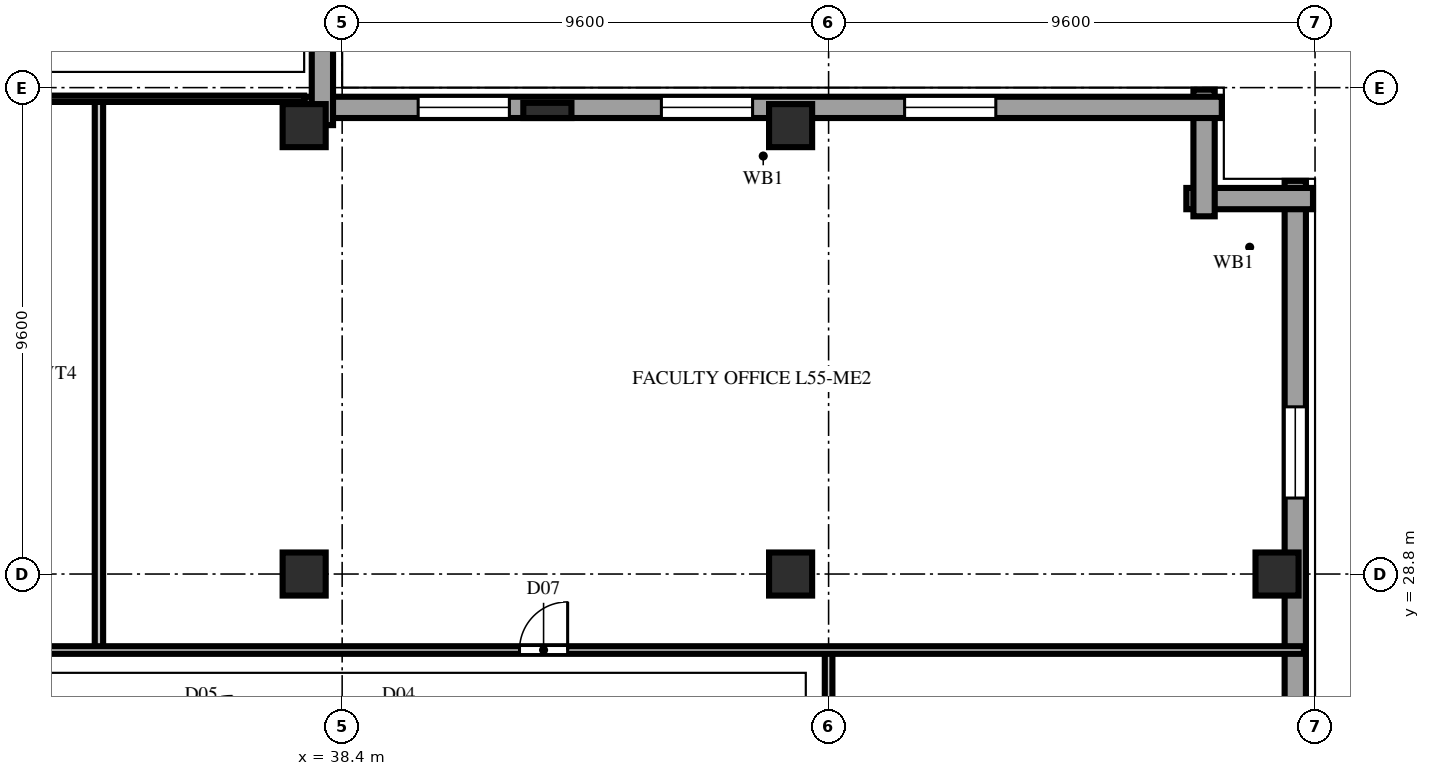
"""IFC4 building model, lengths in metres.
Left out: names, types, materials, properties, quantities, classifications, styles, units other than length and angle.
Written with IfcOpenShell. Run it as: python <this file> out.ifc"""

import sys

from ifc_helpers import new_model, si_unit, direction, frame, frame_2d, origin, origin_2d, place, context, subcontext, project, spatial, rectangle, extrude, element, fill, save


model = new_model("IFC4")
c1 = context("Model", 3, precision=1e-05, world=origin(), true_north=direction((0.0, 1.0)))
c2 = subcontext(c1, "Body", "Model", "MODEL_VIEW")
j1 = project(units=[si_unit("LENGTHUNIT", "METRE"), si_unit("PLANEANGLEUNIT", "RADIAN")], contexts=[c1])
p1 = place(None, origin())
s1 = spatial("IfcSite", under=j1, at=p1, CompositionType="ELEMENT")
p2 = place(p1, origin())
s2 = spatial("IfcBuilding", under=s1, at=p2, CompositionType="ELEMENT")
p3 = place(p2, frame((0.0, 0.0, 218.0)))
s3 = spatial("IfcBuildingStorey", under=s2, at=p3, CompositionType="ELEMENT", Elevation=218.0)
for number, where, z_axis, x_axis in (
    (1, (37.65, 28.8, 0.0), (0.0, 0.0, 1.0), (1.0, 0.0, 0.0)),
    (2, (37.65, 37.65, 0.0), (0.0, 0.0, 1.0), (1.0, 0.0, 0.0)),
    (3, (47.25, 28.8, 0.0), (0.0, 0.0, 1.0), (1.0, 0.0, 0.0)),
    (4, (47.25, 37.65, 0.0), (0.0, 0.0, 1.0), (1.0, 0.0, 0.0)),
    (5, (56.85, 28.8, 0.0), (0.0, 0.0, 1.0), (1.0, 0.0, 0.0)),
):
    element("IfcColumn", number, at=place(p3, frame(where, z_axis=z_axis, x_axis=x_axis)), inside=s3, PredefinedType="COLUMN", context=c2, shape_type="SweptSolid", body=[
        extrude(rectangle(XDim=0.85, YDim=0.85, at=origin_2d()), origin(), (0.0, 0.0, 1.0), 3.8),
    ])
p4 = place(p3, frame((42.45, 37.95, 0.0), z_axis=(0.0, 0.0, 1.0), x_axis=(1.0, 0.0, 0.0)))
e6 = element("IfcColumn", 6, at=p4, inside=s3, PredefinedType="PILASTER", context=c2, shape_type="SweptSolid", body=[
    extrude(rectangle(XDim=0.95, YDim=0.3, at=origin_2d()), origin(), (0.0, 0.0, 1.0), 3.8),
])
p5 = place(p3, frame((57.21, 1.84, 0.0), z_axis=(0.0, 0.0, 1.0), x_axis=(0.0, 1.0, 0.0)))
e7 = element("IfcWall", 7, at=p5, inside=s3, PredefinedType="SOLIDWALL", context=c2, shape_type="SweptSolid", body=[
    extrude(rectangle(XDim=34.72, YDim=0.42, at=frame_2d((17.36, 0.0))), origin(), (0.0, 0.0, 1.0), 3.54),
])
p6 = place(p5, frame((4.46, 0.0, 0.85)))
e8 = element("IfcOpeningElement", 8, at=p6, cuts=e7, PredefinedType="OPENING", context=c2, shape_type="SweptSolid", body=[
    extrude(rectangle(XDim=1.8, YDim=1.85, at=frame_2d((0.9, 0.925))), frame((0.0, 0.222, 0.0), z_axis=(0.0, -1.0, 0.0), x_axis=(1.0, 0.0, 0.0)), (0.0, 0.0, 1.0), 0.444),
])
p7 = place(p5, frame((9.26, 0.0, 0.85)))
e9 = element("IfcOpeningElement", 9, at=p7, cuts=e7, PredefinedType="OPENING", context=c2, shape_type="SweptSolid", body=[
    extrude(rectangle(XDim=1.8, YDim=1.85, at=frame_2d((0.9, 0.925))), frame((0.0, 0.222, 0.0), z_axis=(0.0, -1.0, 0.0), x_axis=(1.0, 0.0, 0.0)), (0.0, 0.0, 1.0), 0.444),
])
p8 = place(p5, frame((14.06, 0.0, 0.85)))
e10 = element("IfcOpeningElement", 10, at=p8, cuts=e7, PredefinedType="OPENING", context=c2, shape_type="SweptSolid", body=[
    extrude(rectangle(XDim=1.8, YDim=1.85, at=frame_2d((0.9, 0.925))), frame((0.0, 0.222, 0.0), z_axis=(0.0, -1.0, 0.0), x_axis=(1.0, 0.0, 0.0)), (0.0, 0.0, 1.0), 0.444),
])
p9 = place(p5, frame((18.86, 0.0, 0.85)))
e11 = element("IfcOpeningElement", 11, at=p9, cuts=e7, PredefinedType="OPENING", context=c2, shape_type="SweptSolid", body=[
    extrude(rectangle(XDim=1.8, YDim=1.85, at=frame_2d((0.9, 0.925))), frame((0.0, 0.222, 0.0), z_axis=(0.0, -1.0, 0.0), x_axis=(1.0, 0.0, 0.0)), (0.0, 0.0, 1.0), 0.444),
])
p10 = place(p5, frame((28.46, 0.0, 0.85)))
e12 = element("IfcOpeningElement", 12, at=p10, cuts=e7, PredefinedType="OPENING", context=c2, shape_type="SweptSolid", body=[
    extrude(rectangle(XDim=1.8, YDim=1.85, at=frame_2d((0.9, 0.925))), frame((0.0, 0.222, 0.0), z_axis=(0.0, -1.0, 0.0), x_axis=(1.0, 0.0, 0.0)), (0.0, 0.0, 1.0), 0.444),
])
for number, where, z_axis, x_axis in (
    (13, (57.56, 36.21, 0.0), (0.0, 0.0, 1.0), (-1.0, 0.0, 0.0)),
    (14, (55.41, 35.86, 0.0), (0.0, 0.0, 1.0), (0.0, 1.0, 0.0)),
):
    element("IfcWall", number, at=place(p3, frame(where, z_axis=z_axis, x_axis=x_axis)), inside=s3, PredefinedType="SOLIDWALL", context=c2, shape_type="SweptSolid", body=[
        extrude(rectangle(XDim=2.5, YDim=0.42, at=frame_2d((1.25, 0.0))), origin(), (0.0, 0.0, 1.0), 3.54),
    ])
p11 = place(p3, frame((55.76, 38.01, 0.0), z_axis=(0.0, 0.0, 1.0), x_axis=(-1.0, 0.0, 0.0)))
e15 = element("IfcWall", 15, at=p11, inside=s3, PredefinedType="SOLIDWALL", context=c2, shape_type="SweptSolid", body=[
    extrude(rectangle(XDim=18.1, YDim=0.42, at=frame_2d((9.05, 0.0))), origin(), (0.0, 0.0, 1.0), 3.54),
])
p12 = place(p11, frame((4.46, 0.0, 0.85)))
e16 = element("IfcOpeningElement", 16, at=p12, cuts=e15, PredefinedType="OPENING", context=c2, shape_type="SweptSolid", body=[
    extrude(rectangle(XDim=1.8, YDim=1.85, at=frame_2d((0.9, 0.925))), frame((0.0, 0.222, 0.0), z_axis=(0.0, -1.0, 0.0), x_axis=(1.0, 0.0, 0.0)), (0.0, 0.0, 1.0), 0.444),
])
p13 = place(p11, frame((9.26, 0.0, 0.85)))
e17 = element("IfcOpeningElement", 17, at=p13, cuts=e15, PredefinedType="OPENING", context=c2, shape_type="SweptSolid", body=[
    extrude(rectangle(XDim=1.8, YDim=1.85, at=frame_2d((0.9, 0.925))), frame((0.0, 0.222, 0.0), z_axis=(0.0, -1.0, 0.0), x_axis=(1.0, 0.0, 0.0)), (0.0, 0.0, 1.0), 0.444),
])
p14 = place(p11, frame((14.06, 0.0, 0.85)))
e18 = element("IfcOpeningElement", 18, at=p14, cuts=e15, PredefinedType="OPENING", context=c2, shape_type="SweptSolid", body=[
    extrude(rectangle(XDim=1.8, YDim=1.85, at=frame_2d((0.9, 0.925))), frame((0.0, 0.222, 0.0), z_axis=(0.0, -1.0, 0.0), x_axis=(1.0, 0.0, 0.0)), (0.0, 0.0, 1.0), 0.444),
])
p15 = place(p3, frame((38.01, 37.66, 0.0), z_axis=(0.0, 0.0, 1.0), x_axis=(0.0, 1.0, 0.0)))
e19 = element("IfcWall", 19, at=p15, inside=s3, PredefinedType="SOLIDWALL", context=c2, shape_type="SweptSolid", body=[
    extrude(rectangle(XDim=18.1, YDim=0.42, at=frame_2d((9.05, 0.0))), origin(), (0.0, 0.0, 1.0), 3.54),
])
p16 = place(p15, frame((2.24, 0.0, 0.85)))
e20 = element("IfcOpeningElement", 20, at=p16, cuts=e19, PredefinedType="OPENING", context=c2, shape_type="SweptSolid", body=[
    extrude(rectangle(XDim=1.8, YDim=1.85, at=frame_2d((0.9, 0.925))), frame((0.0, 0.222, 0.0), z_axis=(0.0, -1.0, 0.0), x_axis=(1.0, 0.0, 0.0)), (0.0, 0.0, 1.0), 0.444),
])
p17 = place(p15, frame((7.04, 0.0, 0.85)))
e21 = element("IfcOpeningElement", 21, at=p17, cuts=e19, PredefinedType="OPENING", context=c2, shape_type="SweptSolid", body=[
    extrude(rectangle(XDim=1.8, YDim=1.85, at=frame_2d((0.9, 0.925))), frame((0.0, 0.222, 0.0), z_axis=(0.0, -1.0, 0.0), x_axis=(1.0, 0.0, 0.0)), (0.0, 0.0, 1.0), 0.444),
])
p18 = place(p15, frame((11.84, 0.0, 0.85)))
e22 = element("IfcOpeningElement", 22, at=p18, cuts=e19, PredefinedType="OPENING", context=c2, shape_type="SweptSolid", body=[
    extrude(rectangle(XDim=1.8, YDim=1.85, at=frame_2d((0.9, 0.925))), frame((0.0, 0.222, 0.0), z_axis=(0.0, -1.0, 0.0), x_axis=(1.0, 0.0, 0.0)), (0.0, 0.0, 1.0), 0.444),
])
p19 = place(p3, frame((48.0, 25.2, 0.0), z_axis=(0.0, 0.0, 1.0), x_axis=(0.0, 1.0, 0.0)))
e23 = element("IfcWall", 23, at=p19, inside=s3, PredefinedType="PARTITIONING", context=c2, shape_type="SweptSolid", body=[
    extrude(rectangle(XDim=2.1, YDim=0.15, at=frame_2d((1.05, 0.0))), origin(), (0.0, 0.0, 1.0), 3.54),
])
p20 = place(p3, frame((33.6, 27.3, 0.0), z_axis=(0.0, 0.0, 1.0), x_axis=(0.0, 1.0, 0.0)))
e24 = element("IfcWall", 24, at=p20, inside=s3, PredefinedType="PLUMBINGWALL", context=c2, shape_type="SweptSolid", body=[
    extrude(rectangle(XDim=10.88, YDim=0.165, at=frame_2d((5.44, 0.0))), origin(), (0.0, 0.0, 1.0), 3.54),
])
p21 = place(p3, frame((19.2, 27.3, 0.0), z_axis=(0.0, 0.0, 1.0), x_axis=(1.0, 0.0, 0.0)))
e25 = element("IfcWall", 25, at=p21, inside=s3, PredefinedType="PARTITIONING", context=c2, shape_type="SweptSolid", body=[
    extrude(rectangle(XDim=38.18, YDim=0.15, at=frame_2d((19.09, 0.0))), origin(), (0.0, 0.0, 1.0), 3.54),
])
p22 = place(p21, frame((4.3, 0.0, 0.0)))
e26 = element("IfcOpeningElement", 26, at=p22, cuts=e25, PredefinedType="OPENING", context=c2, shape_type="SweptSolid", body=[
    extrude(rectangle(XDim=1.2, YDim=2.2, at=frame_2d((0.6, 1.1))), frame((0.0, 0.087, 0.0), z_axis=(0.0, -1.0, 0.0), x_axis=(1.0, 0.0, 0.0)), (0.0, 0.0, 1.0), 0.174),
])
p23 = place(p21, frame((22.7, 0.0, 0.0)))
e27 = element("IfcOpeningElement", 27, at=p23, cuts=e25, PredefinedType="OPENING", context=c2, shape_type="SweptSolid", body=[
    extrude(rectangle(XDim=0.95, YDim=2.15, at=frame_2d((0.475, 1.075))), frame((0.0, 0.087, 0.0), z_axis=(0.0, -1.0, 0.0), x_axis=(1.0, 0.0, 0.0)), (0.0, 0.0, 1.0), 0.174),
])
p24 = place(p3, frame((19.28, 38.18, 0.0), z_axis=(0.0, 0.0, 1.0), x_axis=(1.0, 0.0, 0.0)))
e28 = element("IfcWall", 28, at=p24, inside=s3, PredefinedType="PARTITIONING", context=c2, shape_type="SweptSolid", body=[
    extrude(rectangle(XDim=18.37, YDim=0.125, at=frame_2d((9.185, 0.0))), origin(), (0.0, 0.0, 1.0), 3.54),
])
p25 = place(p10, origin())
e29 = element("IfcWindow", 29, at=p25, inside=s3, PartitioningType="DOUBLE_PANEL_VERTICAL", PredefinedType="WINDOW", context=c2, shape_type="SweptSolid", body=[
    extrude(rectangle(XDim=1.8, YDim=1.85, at=frame_2d((0.9, 0.925))), frame((0.0, 0.11, 0.0), z_axis=(0.0, -1.0, 0.0), x_axis=(1.0, 0.0, 0.0)), (0.0, 0.0, 1.0), 0.06),
])
fill(e12, e29)
p26 = place(p12, origin())
e30 = element("IfcWindow", 30, at=p26, inside=s3, PartitioningType="DOUBLE_PANEL_VERTICAL", PredefinedType="WINDOW", context=c2, shape_type="SweptSolid", body=[
    extrude(rectangle(XDim=1.8, YDim=1.85, at=frame_2d((0.9, 0.925))), frame((0.0, 0.11, 0.0), z_axis=(0.0, -1.0, 0.0), x_axis=(1.0, 0.0, 0.0)), (0.0, 0.0, 1.0), 0.06),
])
fill(e16, e30)
p27 = place(p13, origin())
e31 = element("IfcWindow", 31, at=p27, inside=s3, PartitioningType="DOUBLE_PANEL_VERTICAL", PredefinedType="WINDOW", context=c2, shape_type="SweptSolid", body=[
    extrude(rectangle(XDim=1.8, YDim=1.85, at=frame_2d((0.9, 0.925))), frame((0.0, 0.11, 0.0), z_axis=(0.0, -1.0, 0.0), x_axis=(1.0, 0.0, 0.0)), (0.0, 0.0, 1.0), 0.06),
])
fill(e17, e31)
p28 = place(p14, origin())
e32 = element("IfcWindow", 32, at=p28, inside=s3, PartitioningType="DOUBLE_PANEL_VERTICAL", PredefinedType="WINDOW", context=c2, shape_type="SweptSolid", body=[
    extrude(rectangle(XDim=1.8, YDim=1.85, at=frame_2d((0.9, 0.925))), frame((0.0, 0.11, 0.0), z_axis=(0.0, -1.0, 0.0), x_axis=(1.0, 0.0, 0.0)), (0.0, 0.0, 1.0), 0.06),
])
fill(e18, e32)
p29 = place(p23, origin())
e33 = element("IfcDoor", 33, at=p29, inside=s3, OperationType="SINGLE_SWING_RIGHT", PredefinedType="DOOR", context=c2, shape_type="SweptSolid", body=[
    extrude(rectangle(XDim=0.95, YDim=2.15, at=frame_2d((0.475, 1.075))), frame((0.0, 0.025, 0.0), z_axis=(0.0, -1.0, 0.0), x_axis=(1.0, 0.0, 0.0)), (0.0, 0.0, 1.0), 0.05),
])
fill(e27, e33)
save(model, sys.argv[1])
